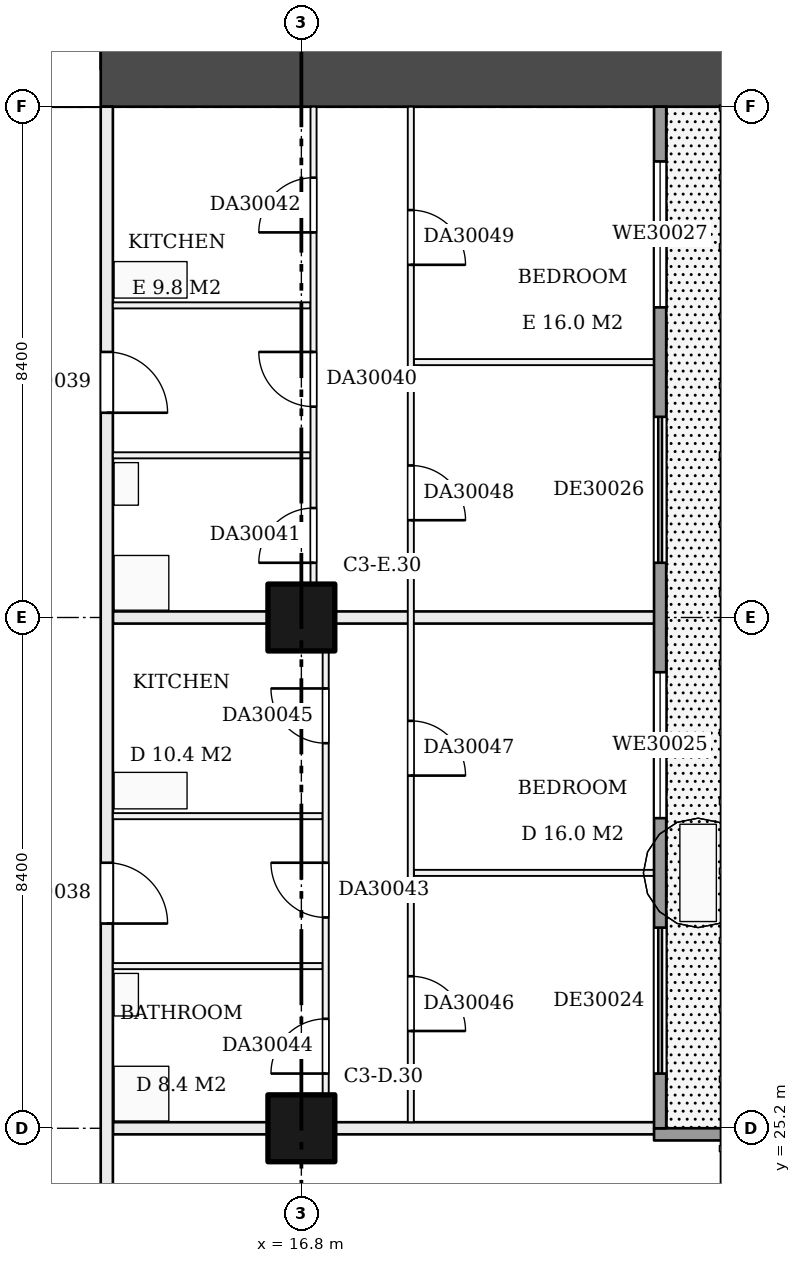
"""IFC4 building model, lengths in metres.
Left out: names, types, materials, properties, quantities, classifications, styles, units other than length and angle.
Written with IfcOpenShell. Run it as: python <this file> out.ifc"""

import sys

from ifc_helpers import new_model, si_unit, direction, frame, frame_2d, origin, origin_2d, place, context, subcontext, project, spatial, rectangle, extrude, element, fill, save


model = new_model("IFC4")
c1 = context("Model", 3, precision=1e-05, world=origin(), true_north=direction((0.0, 1.0)))
c2 = subcontext(c1, "Body", "Model", "MODEL_VIEW")
j1 = project(units=[si_unit("LENGTHUNIT", "METRE"), si_unit("PLANEANGLEUNIT", "RADIAN")], contexts=[c1])
p1 = place(None, origin())
s1 = spatial("IfcSite", under=j1, at=p1, CompositionType="ELEMENT")
p2 = place(p1, origin())
s2 = spatial("IfcBuilding", under=s1, at=p2, CompositionType="ELEMENT")
p3 = place(p2, frame((0.0, 0.0, 119.7)))
s3 = spatial("IfcBuildingStorey", under=s2, at=p3, CompositionType="ELEMENT", Elevation=119.7)
for number, where, z_axis, x_axis in (
    (1, (16.8, 25.2, 0.0), (0.0, 0.0, 1.0), (1.0, 0.0, 0.0)),
    (2, (16.8, 33.6, 0.0), (0.0, 0.0, 1.0), (1.0, 0.0, 0.0)),
):
    element("IfcColumn", number, at=place(p3, frame(where, z_axis=z_axis, x_axis=x_axis)), inside=s3, PredefinedType="COLUMN", context=c2, shape_type="SweptSolid", body=[
        extrude(rectangle(XDim=1.1, YDim=1.1, at=origin_2d()), origin(), (0.0, 0.0, 1.0), 3.22),
    ])
p4 = place(p3, frame((9.6, 42.6, 0.0), z_axis=(0.0, 0.0, 1.0), x_axis=(1.0, 0.0, 0.0)))
e3 = element("IfcWall", 3, at=p4, inside=s3, PredefinedType="SHEAR", context=c2, shape_type="SweptSolid", body=[
    extrude(rectangle(XDim=14.4, YDim=1.2, at=frame_2d((7.2, 0.0))), origin(), (0.0, 0.0, 1.0), 3.22),
])
p5 = place(p4, frame((2.1, 0.0, 0.0)))
e4 = element("IfcOpeningElement", 4, at=p5, cuts=e3, PredefinedType="OPENING", context=c2, shape_type="SweptSolid", body=[
    extrude(rectangle(XDim=1.8, YDim=2.1, at=frame_2d((0.9, 1.05))), frame((0.0, 0.61, 0.0), z_axis=(0.0, -1.0, 0.0), x_axis=(1.0, 0.0, 0.0)), (0.0, 0.0, 1.0), 1.22),
])
p6 = place(p3, frame((13.7, 25.2, 0.0), z_axis=(0.0, 0.0, 1.0), x_axis=(1.0, 0.0, 0.0)))
e5 = element("IfcWall", 5, at=p6, inside=s3, PredefinedType="PARTITIONING", context=c2, shape_type="SweptSolid", body=[
    extrude(rectangle(XDim=9.0, YDim=0.2, at=frame_2d((4.5, 0.0))), origin(), (0.0, 0.0, 1.0), 3.22),
])
p7 = place(p3, frame((13.7, 27.867, 0.0), z_axis=(0.0, 0.0, 1.0), x_axis=(1.0, 0.0, 0.0)))
e6 = element("IfcWall", 6, at=p7, inside=s3, PredefinedType="PARTITIONING", context=c2, shape_type="SweptSolid", body=[
    extrude(rectangle(XDim=3.45, YDim=0.1, at=frame_2d((1.725, 0.0))), origin(), (0.0, 0.0, 1.0), 3.22),
])
p8 = place(p3, frame((18.65, 29.4, 0.0), z_axis=(0.0, 0.0, 1.0), x_axis=(1.0, 0.0, 0.0)))
e7 = element("IfcWall", 7, at=p8, inside=s3, PredefinedType="PARTITIONING", context=c2, shape_type="SweptSolid", body=[
    extrude(rectangle(XDim=4.05, YDim=0.1, at=frame_2d((2.025, 0.0))), origin(), (0.0, 0.0, 1.0), 3.22),
])
p9 = place(p3, frame((13.7, 30.333, 0.0), z_axis=(0.0, 0.0, 1.0), x_axis=(1.0, 0.0, 0.0)))
e8 = element("IfcWall", 8, at=p9, inside=s3, PredefinedType="PARTITIONING", context=c2, shape_type="SweptSolid", body=[
    extrude(rectangle(XDim=3.45, YDim=0.1, at=frame_2d((1.725, 0.0))), origin(), (0.0, 0.0, 1.0), 3.22),
])
p10 = place(p3, frame((13.7, 33.6, 0.0), z_axis=(0.0, 0.0, 1.0), x_axis=(1.0, 0.0, 0.0)))
e9 = element("IfcWall", 9, at=p10, inside=s3, PredefinedType="PARTITIONING", context=c2, shape_type="SweptSolid", body=[
    extrude(rectangle(XDim=9.0, YDim=0.2, at=frame_2d((4.5, 0.0))), origin(), (0.0, 0.0, 1.0), 3.22),
])
p11 = place(p3, frame((13.7, 36.267, 0.0), z_axis=(0.0, 0.0, 1.0), x_axis=(1.0, 0.0, 0.0)))
e10 = element("IfcWall", 10, at=p11, inside=s3, PredefinedType="PARTITIONING", context=c2, shape_type="SweptSolid", body=[
    extrude(rectangle(XDim=3.25, YDim=0.1, at=frame_2d((1.625, 0.0))), origin(), (0.0, 0.0, 1.0), 3.22),
])
p12 = place(p3, frame((18.65, 37.8, 0.0), z_axis=(0.0, 0.0, 1.0), x_axis=(1.0, 0.0, 0.0)))
e11 = element("IfcWall", 11, at=p12, inside=s3, PredefinedType="PARTITIONING", context=c2, shape_type="SweptSolid", body=[
    extrude(rectangle(XDim=4.05, YDim=0.1, at=frame_2d((2.025, 0.0))), origin(), (0.0, 0.0, 1.0), 3.22),
])
p13 = place(p3, frame((13.7, 38.733, 0.0), z_axis=(0.0, 0.0, 1.0), x_axis=(1.0, 0.0, 0.0)))
e12 = element("IfcWall", 12, at=p13, inside=s3, PredefinedType="PARTITIONING", context=c2, shape_type="SweptSolid", body=[
    extrude(rectangle(XDim=3.25, YDim=0.1, at=frame_2d((1.625, 0.0))), origin(), (0.0, 0.0, 1.0), 3.22),
])
p14 = place(p3, frame((13.6, 23.0, 0.0), z_axis=(0.0, 0.0, 1.0), x_axis=(0.0, 1.0, 0.0)))
e13 = element("IfcWall", 13, at=p14, inside=s3, PredefinedType="PARTITIONING", context=c2, shape_type="SweptSolid", body=[
    extrude(rectangle(XDim=19.0, YDim=0.2, at=frame_2d((9.5, 0.0))), origin(), (0.0, 0.0, 1.0), 3.22),
])
p15 = place(p14, frame((5.567, 0.0, 0.0)))
e14 = element("IfcOpeningElement", 14, at=p15, cuts=e13, PredefinedType="OPENING", context=c2, shape_type="SweptSolid", body=[
    extrude(rectangle(XDim=1.0, YDim=2.1, at=frame_2d((0.5, 1.05))), frame((0.0, 0.11, 0.0), z_axis=(0.0, -1.0, 0.0), x_axis=(1.0, 0.0, 0.0)), (0.0, 0.0, 1.0), 0.22),
])
p16 = place(p14, frame((13.967, 0.0, 0.0)))
e15 = element("IfcOpeningElement", 15, at=p16, cuts=e13, PredefinedType="OPENING", context=c2, shape_type="SweptSolid", body=[
    extrude(rectangle(XDim=1.0, YDim=2.1, at=frame_2d((0.5, 1.05))), frame((0.0, 0.11, 0.0), z_axis=(0.0, -1.0, 0.0), x_axis=(1.0, 0.0, 0.0)), (0.0, 0.0, 1.0), 0.22),
])
p17 = place(p3, frame((17.0, 33.7, 0.0), z_axis=(0.0, 0.0, 1.0), x_axis=(0.0, 1.0, 0.0)))
e16 = element("IfcWall", 16, at=p17, inside=s3, PredefinedType="PARTITIONING", context=c2, shape_type="SweptSolid", body=[
    extrude(rectangle(XDim=8.3, YDim=0.1, at=frame_2d((4.15, 0.0))), origin(), (0.0, 0.0, 1.0), 3.22),
])
p18 = place(p17, frame((3.367, 0.0, 0.0)))
e17 = element("IfcOpeningElement", 17, at=p18, cuts=e16, PredefinedType="OPENING", context=c2, shape_type="SweptSolid", body=[
    extrude(rectangle(XDim=0.9, YDim=2.1, at=frame_2d((0.45, 1.05))), frame((0.0, 0.06, 0.0), z_axis=(0.0, -1.0, 0.0), x_axis=(1.0, 0.0, 0.0)), (0.0, 0.0, 1.0), 0.12),
])
p19 = place(p17, frame((0.8, 0.0, 0.0)))
e18 = element("IfcOpeningElement", 18, at=p19, cuts=e16, PredefinedType="OPENING", context=c2, shape_type="SweptSolid", body=[
    extrude(rectangle(XDim=0.9, YDim=2.1, at=frame_2d((0.45, 1.05))), frame((0.0, 0.06, 0.0), z_axis=(0.0, -1.0, 0.0), x_axis=(1.0, 0.0, 0.0)), (0.0, 0.0, 1.0), 0.12),
])
p20 = place(p17, frame((6.233, 0.0, 0.0)))
e19 = element("IfcOpeningElement", 19, at=p20, cuts=e16, PredefinedType="OPENING", context=c2, shape_type="SweptSolid", body=[
    extrude(rectangle(XDim=0.9, YDim=2.1, at=frame_2d((0.45, 1.05))), frame((0.0, 0.06, 0.0), z_axis=(0.0, -1.0, 0.0), x_axis=(1.0, 0.0, 0.0)), (0.0, 0.0, 1.0), 0.12),
])
p21 = place(p3, frame((17.2, 25.3, 0.0), z_axis=(0.0, 0.0, 1.0), x_axis=(0.0, 1.0, 0.0)))
e20 = element("IfcWall", 20, at=p21, inside=s3, PredefinedType="PARTITIONING", context=c2, shape_type="SweptSolid", body=[
    extrude(rectangle(XDim=8.2, YDim=0.1, at=frame_2d((4.1, 0.0))), origin(), (0.0, 0.0, 1.0), 3.22),
])
p22 = place(p21, frame((3.367, 0.0, 0.0)))
e21 = element("IfcOpeningElement", 21, at=p22, cuts=e20, PredefinedType="OPENING", context=c2, shape_type="SweptSolid", body=[
    extrude(rectangle(XDim=0.9, YDim=2.1, at=frame_2d((0.45, 1.05))), frame((0.0, 0.06, 0.0), z_axis=(0.0, -1.0, 0.0), x_axis=(1.0, 0.0, 0.0)), (0.0, 0.0, 1.0), 0.12),
])
p23 = place(p21, frame((0.8, 0.0, 0.0)))
e22 = element("IfcOpeningElement", 22, at=p23, cuts=e20, PredefinedType="OPENING", context=c2, shape_type="SweptSolid", body=[
    extrude(rectangle(XDim=0.9, YDim=2.1, at=frame_2d((0.45, 1.05))), frame((0.0, 0.06, 0.0), z_axis=(0.0, -1.0, 0.0), x_axis=(1.0, 0.0, 0.0)), (0.0, 0.0, 1.0), 0.12),
])
p24 = place(p21, frame((6.233, 0.0, 0.0)))
e23 = element("IfcOpeningElement", 23, at=p24, cuts=e20, PredefinedType="OPENING", context=c2, shape_type="SweptSolid", body=[
    extrude(rectangle(XDim=0.9, YDim=2.1, at=frame_2d((0.45, 1.05))), frame((0.0, 0.06, 0.0), z_axis=(0.0, -1.0, 0.0), x_axis=(1.0, 0.0, 0.0)), (0.0, 0.0, 1.0), 0.12),
])
p25 = place(p3, frame((18.6, 25.3, 0.0), z_axis=(0.0, 0.0, 1.0), x_axis=(0.0, 1.0, 0.0)))
e24 = element("IfcWall", 24, at=p25, inside=s3, PredefinedType="PARTITIONING", context=c2, shape_type="SweptSolid", body=[
    extrude(rectangle(XDim=16.7, YDim=0.1, at=frame_2d((8.35, 0.0))), origin(), (0.0, 0.0, 1.0), 3.22),
])
p26 = place(p25, frame((1.5, 0.0, 0.0)))
e25 = element("IfcOpeningElement", 25, at=p26, cuts=e24, PredefinedType="OPENING", context=c2, shape_type="SweptSolid", body=[
    extrude(rectangle(XDim=0.9, YDim=2.1, at=frame_2d((0.45, 1.05))), frame((0.0, 0.06, 0.0), z_axis=(0.0, -1.0, 0.0), x_axis=(1.0, 0.0, 0.0)), (0.0, 0.0, 1.0), 0.12),
])
p27 = place(p25, frame((5.7, 0.0, 0.0)))
e26 = element("IfcOpeningElement", 26, at=p27, cuts=e24, PredefinedType="OPENING", context=c2, shape_type="SweptSolid", body=[
    extrude(rectangle(XDim=0.9, YDim=2.1, at=frame_2d((0.45, 1.05))), frame((0.0, 0.06, 0.0), z_axis=(0.0, -1.0, 0.0), x_axis=(1.0, 0.0, 0.0)), (0.0, 0.0, 1.0), 0.12),
])
p28 = place(p25, frame((9.9, 0.0, 0.0)))
e27 = element("IfcOpeningElement", 27, at=p28, cuts=e24, PredefinedType="OPENING", context=c2, shape_type="SweptSolid", body=[
    extrude(rectangle(XDim=0.9, YDim=2.1, at=frame_2d((0.45, 1.05))), frame((0.0, 0.06, 0.0), z_axis=(0.0, -1.0, 0.0), x_axis=(1.0, 0.0, 0.0)), (0.0, 0.0, 1.0), 0.12),
])
p29 = place(p25, frame((14.1, 0.0, 0.0)))
e28 = element("IfcOpeningElement", 28, at=p29, cuts=e24, PredefinedType="OPENING", context=c2, shape_type="SweptSolid", body=[
    extrude(rectangle(XDim=0.9, YDim=2.1, at=frame_2d((0.45, 1.05))), frame((0.0, 0.06, 0.0), z_axis=(0.0, -1.0, 0.0), x_axis=(1.0, 0.0, 0.0)), (0.0, 0.0, 1.0), 0.12),
])
p30 = place(p3, frame((24.6, 25.1, 0.0), z_axis=(0.0, 0.0, 1.0), x_axis=(-1.0, 0.0, 0.0)))
e29 = element("IfcWall", 29, at=p30, inside=s3, PredefinedType="SOLIDWALL", context=c2, shape_type="SweptSolid", body=[
    extrude(rectangle(XDim=2.0, YDim=0.2, at=frame_2d((1.0, 0.0))), origin(), (0.0, 0.0, 1.0), 3.22),
])
p31 = place(p3, frame((22.7, 25.2, 0.0), z_axis=(0.0, 0.0, 1.0), x_axis=(0.0, 1.0, 0.0)))
e30 = element("IfcWall", 30, at=p31, inside=s3, PredefinedType="SOLIDWALL", context=c2, shape_type="SweptSolid", body=[
    extrude(rectangle(XDim=16.8, YDim=0.2, at=frame_2d((8.4, 0.0))), origin(), (0.0, 0.0, 1.0), 3.22),
])
p32 = place(p31, frame((0.9, 0.0, 0.0)))
e31 = element("IfcOpeningElement", 31, at=p32, cuts=e30, PredefinedType="OPENING", context=c2, shape_type="SweptSolid", body=[
    extrude(rectangle(XDim=2.4, YDim=2.2, at=frame_2d((1.2, 1.1))), frame((0.0, 0.11, 0.0), z_axis=(0.0, -1.0, 0.0), x_axis=(1.0, 0.0, 0.0)), (0.0, 0.0, 1.0), 0.22),
])
p33 = place(p31, frame((5.1, 0.0, 0.9)))
e32 = element("IfcOpeningElement", 32, at=p33, cuts=e30, PredefinedType="OPENING", context=c2, shape_type="SweptSolid", body=[
    extrude(rectangle(XDim=2.4, YDim=1.5, at=frame_2d((1.2, 0.75))), frame((0.0, 0.11, 0.0), z_axis=(0.0, -1.0, 0.0), x_axis=(1.0, 0.0, 0.0)), (0.0, 0.0, 1.0), 0.22),
])
p34 = place(p31, frame((9.3, 0.0, 0.0)))
e33 = element("IfcOpeningElement", 33, at=p34, cuts=e30, PredefinedType="OPENING", context=c2, shape_type="SweptSolid", body=[
    extrude(rectangle(XDim=2.4, YDim=2.2, at=frame_2d((1.2, 1.1))), frame((0.0, 0.11, 0.0), z_axis=(0.0, -1.0, 0.0), x_axis=(1.0, 0.0, 0.0)), (0.0, 0.0, 1.0), 0.22),
])
p35 = place(p31, frame((13.5, 0.0, 0.9)))
e34 = element("IfcOpeningElement", 34, at=p35, cuts=e30, PredefinedType="OPENING", context=c2, shape_type="SweptSolid", body=[
    extrude(rectangle(XDim=2.4, YDim=1.5, at=frame_2d((1.2, 0.75))), frame((0.0, 0.11, 0.0), z_axis=(0.0, -1.0, 0.0), x_axis=(1.0, 0.0, 0.0)), (0.0, 0.0, 1.0), 0.22),
])
p36 = place(p5, origin())
e35 = element("IfcDoor", 35, at=p36, inside=s3, OperationType="DOUBLE_DOOR_SINGLE_SWING", PredefinedType="DOOR", context=c2, shape_type="SweptSolid", body=[
    extrude(rectangle(XDim=1.8, YDim=2.1, at=frame_2d((0.9, 1.05))), frame((0.0, 0.025, 0.0), z_axis=(0.0, -1.0, 0.0), x_axis=(1.0, 0.0, 0.0)), (0.0, 0.0, 1.0), 0.05),
])
fill(e4, e35)
p37 = place(p15, frame((1.0, 0.0, 0.0), z_axis=(0.0, 0.0, 1.0), x_axis=(-1.0, 0.0, 0.0)))
e36 = element("IfcDoor", 36, at=p37, inside=s3, OperationType="SINGLE_SWING_RIGHT", PredefinedType="DOOR", context=c2, shape_type="SweptSolid", body=[
    extrude(rectangle(XDim=1.0, YDim=2.1, at=frame_2d((0.5, 1.05))), frame((0.0, 0.025, 0.0), z_axis=(0.0, -1.0, 0.0), x_axis=(1.0, 0.0, 0.0)), (0.0, 0.0, 1.0), 0.05),
])
fill(e14, e36)
p38 = place(p16, frame((1.0, 0.0, 0.0), z_axis=(0.0, 0.0, 1.0), x_axis=(-1.0, 0.0, 0.0)))
e37 = element("IfcDoor", 37, at=p38, inside=s3, OperationType="SINGLE_SWING_RIGHT", PredefinedType="DOOR", context=c2, shape_type="SweptSolid", body=[
    extrude(rectangle(XDim=1.0, YDim=2.1, at=frame_2d((0.5, 1.05))), frame((0.0, 0.025, 0.0), z_axis=(0.0, -1.0, 0.0), x_axis=(1.0, 0.0, 0.0)), (0.0, 0.0, 1.0), 0.05),
])
fill(e15, e37)
p39 = place(p18, origin())
e38 = element("IfcDoor", 38, at=p39, inside=s3, OperationType="SINGLE_SWING_RIGHT", PredefinedType="DOOR", context=c2, shape_type="SweptSolid", body=[
    extrude(rectangle(XDim=0.9, YDim=2.1, at=frame_2d((0.45, 1.05))), frame((0.0, 0.025, 0.0), z_axis=(0.0, -1.0, 0.0), x_axis=(1.0, 0.0, 0.0)), (0.0, 0.0, 1.0), 0.05),
])
fill(e17, e38)
p40 = place(p19, origin())
e39 = element("IfcDoor", 39, at=p40, inside=s3, OperationType="SINGLE_SWING_LEFT", PredefinedType="DOOR", context=c2, shape_type="SweptSolid", body=[
    extrude(rectangle(XDim=0.9, YDim=2.1, at=frame_2d((0.45, 1.05))), frame((0.0, 0.025, 0.0), z_axis=(0.0, -1.0, 0.0), x_axis=(1.0, 0.0, 0.0)), (0.0, 0.0, 1.0), 0.05),
])
fill(e18, e39)
p41 = place(p20, origin())
e40 = element("IfcDoor", 40, at=p41, inside=s3, OperationType="SINGLE_SWING_LEFT", PredefinedType="DOOR", context=c2, shape_type="SweptSolid", body=[
    extrude(rectangle(XDim=0.9, YDim=2.1, at=frame_2d((0.45, 1.05))), frame((0.0, 0.025, 0.0), z_axis=(0.0, -1.0, 0.0), x_axis=(1.0, 0.0, 0.0)), (0.0, 0.0, 1.0), 0.05),
])
fill(e19, e40)
p42 = place(p22, origin())
e41 = element("IfcDoor", 41, at=p42, inside=s3, OperationType="SINGLE_SWING_RIGHT", PredefinedType="DOOR", context=c2, shape_type="SweptSolid", body=[
    extrude(rectangle(XDim=0.9, YDim=2.1, at=frame_2d((0.45, 1.05))), frame((0.0, 0.025, 0.0), z_axis=(0.0, -1.0, 0.0), x_axis=(1.0, 0.0, 0.0)), (0.0, 0.0, 1.0), 0.05),
])
fill(e21, e41)
p43 = place(p23, origin())
e42 = element("IfcDoor", 42, at=p43, inside=s3, OperationType="SINGLE_SWING_LEFT", PredefinedType="DOOR", context=c2, shape_type="SweptSolid", body=[
    extrude(rectangle(XDim=0.9, YDim=2.1, at=frame_2d((0.45, 1.05))), frame((0.0, 0.025, 0.0), z_axis=(0.0, -1.0, 0.0), x_axis=(1.0, 0.0, 0.0)), (0.0, 0.0, 1.0), 0.05),
])
fill(e22, e42)
p44 = place(p24, origin())
e43 = element("IfcDoor", 43, at=p44, inside=s3, OperationType="SINGLE_SWING_RIGHT", PredefinedType="DOOR", context=c2, shape_type="SweptSolid", body=[
    extrude(rectangle(XDim=0.9, YDim=2.1, at=frame_2d((0.45, 1.05))), frame((0.0, 0.025, 0.0), z_axis=(0.0, -1.0, 0.0), x_axis=(1.0, 0.0, 0.0)), (0.0, 0.0, 1.0), 0.05),
])
fill(e23, e43)
p45 = place(p26, frame((0.9, 0.0, 0.0), z_axis=(0.0, 0.0, 1.0), x_axis=(-1.0, 0.0, 0.0)))
e44 = element("IfcDoor", 44, at=p45, inside=s3, OperationType="SINGLE_SWING_RIGHT", PredefinedType="DOOR", context=c2, shape_type="SweptSolid", body=[
    extrude(rectangle(XDim=0.9, YDim=2.1, at=frame_2d((0.45, 1.05))), frame((0.0, 0.025, 0.0), z_axis=(0.0, -1.0, 0.0), x_axis=(1.0, 0.0, 0.0)), (0.0, 0.0, 1.0), 0.05),
])
fill(e25, e44)
p46 = place(p27, frame((0.9, 0.0, 0.0), z_axis=(0.0, 0.0, 1.0), x_axis=(-1.0, 0.0, 0.0)))
e45 = element("IfcDoor", 45, at=p46, inside=s3, OperationType="SINGLE_SWING_RIGHT", PredefinedType="DOOR", context=c2, shape_type="SweptSolid", body=[
    extrude(rectangle(XDim=0.9, YDim=2.1, at=frame_2d((0.45, 1.05))), frame((0.0, 0.025, 0.0), z_axis=(0.0, -1.0, 0.0), x_axis=(1.0, 0.0, 0.0)), (0.0, 0.0, 1.0), 0.05),
])
fill(e26, e45)
p47 = place(p28, frame((0.9, 0.0, 0.0), z_axis=(0.0, 0.0, 1.0), x_axis=(-1.0, 0.0, 0.0)))
e46 = element("IfcDoor", 46, at=p47, inside=s3, OperationType="SINGLE_SWING_RIGHT", PredefinedType="DOOR", context=c2, shape_type="SweptSolid", body=[
    extrude(rectangle(XDim=0.9, YDim=2.1, at=frame_2d((0.45, 1.05))), frame((0.0, 0.025, 0.0), z_axis=(0.0, -1.0, 0.0), x_axis=(1.0, 0.0, 0.0)), (0.0, 0.0, 1.0), 0.05),
])
fill(e27, e46)
p48 = place(p29, frame((0.9, 0.0, 0.0), z_axis=(0.0, 0.0, 1.0), x_axis=(-1.0, 0.0, 0.0)))
e47 = element("IfcDoor", 47, at=p48, inside=s3, OperationType="SINGLE_SWING_RIGHT", PredefinedType="DOOR", context=c2, shape_type="SweptSolid", body=[
    extrude(rectangle(XDim=0.9, YDim=2.1, at=frame_2d((0.45, 1.05))), frame((0.0, 0.025, 0.0), z_axis=(0.0, -1.0, 0.0), x_axis=(1.0, 0.0, 0.0)), (0.0, 0.0, 1.0), 0.05),
])
fill(e28, e47)
p49 = place(p32, origin())
e48 = element("IfcDoor", 48, at=p49, inside=s3, OperationType="DOUBLE_DOOR_SLIDING", PredefinedType="DOOR", context=c2, shape_type="SweptSolid", body=[
    extrude(rectangle(XDim=2.4, YDim=2.2, at=frame_2d((1.2, 1.1))), frame((0.0, 0.025, 0.0), z_axis=(0.0, -1.0, 0.0), x_axis=(1.0, 0.0, 0.0)), (0.0, 0.0, 1.0), 0.05),
])
fill(e31, e48)
p50 = place(p33, origin())
e49 = element("IfcWindow", 49, at=p50, inside=s3, PartitioningType="SINGLE_PANEL", PredefinedType="WINDOW", context=c2, shape_type="SweptSolid", body=[
    extrude(rectangle(XDim=2.4, YDim=1.5, at=frame_2d((1.2, 0.75))), frame((0.0, 0.03, 0.0), z_axis=(0.0, -1.0, 0.0), x_axis=(1.0, 0.0, 0.0)), (0.0, 0.0, 1.0), 0.06),
])
fill(e32, e49)
p51 = place(p34, origin())
e50 = element("IfcDoor", 50, at=p51, inside=s3, OperationType="DOUBLE_DOOR_SLIDING", PredefinedType="DOOR", context=c2, shape_type="SweptSolid", body=[
    extrude(rectangle(XDim=2.4, YDim=2.2, at=frame_2d((1.2, 1.1))), frame((0.0, 0.025, 0.0), z_axis=(0.0, -1.0, 0.0), x_axis=(1.0, 0.0, 0.0)), (0.0, 0.0, 1.0), 0.05),
])
fill(e33, e50)
p52 = place(p35, origin())
e51 = element("IfcWindow", 51, at=p52, inside=s3, PartitioningType="SINGLE_PANEL", PredefinedType="WINDOW", context=c2, shape_type="SweptSolid", body=[
    extrude(rectangle(XDim=2.4, YDim=1.5, at=frame_2d((1.2, 0.75))), frame((0.0, 0.03, 0.0), z_axis=(0.0, -1.0, 0.0), x_axis=(1.0, 0.0, 0.0)), (0.0, 0.0, 1.0), 0.06),
])
fill(e34, e51)
save(model, sys.argv[1])
